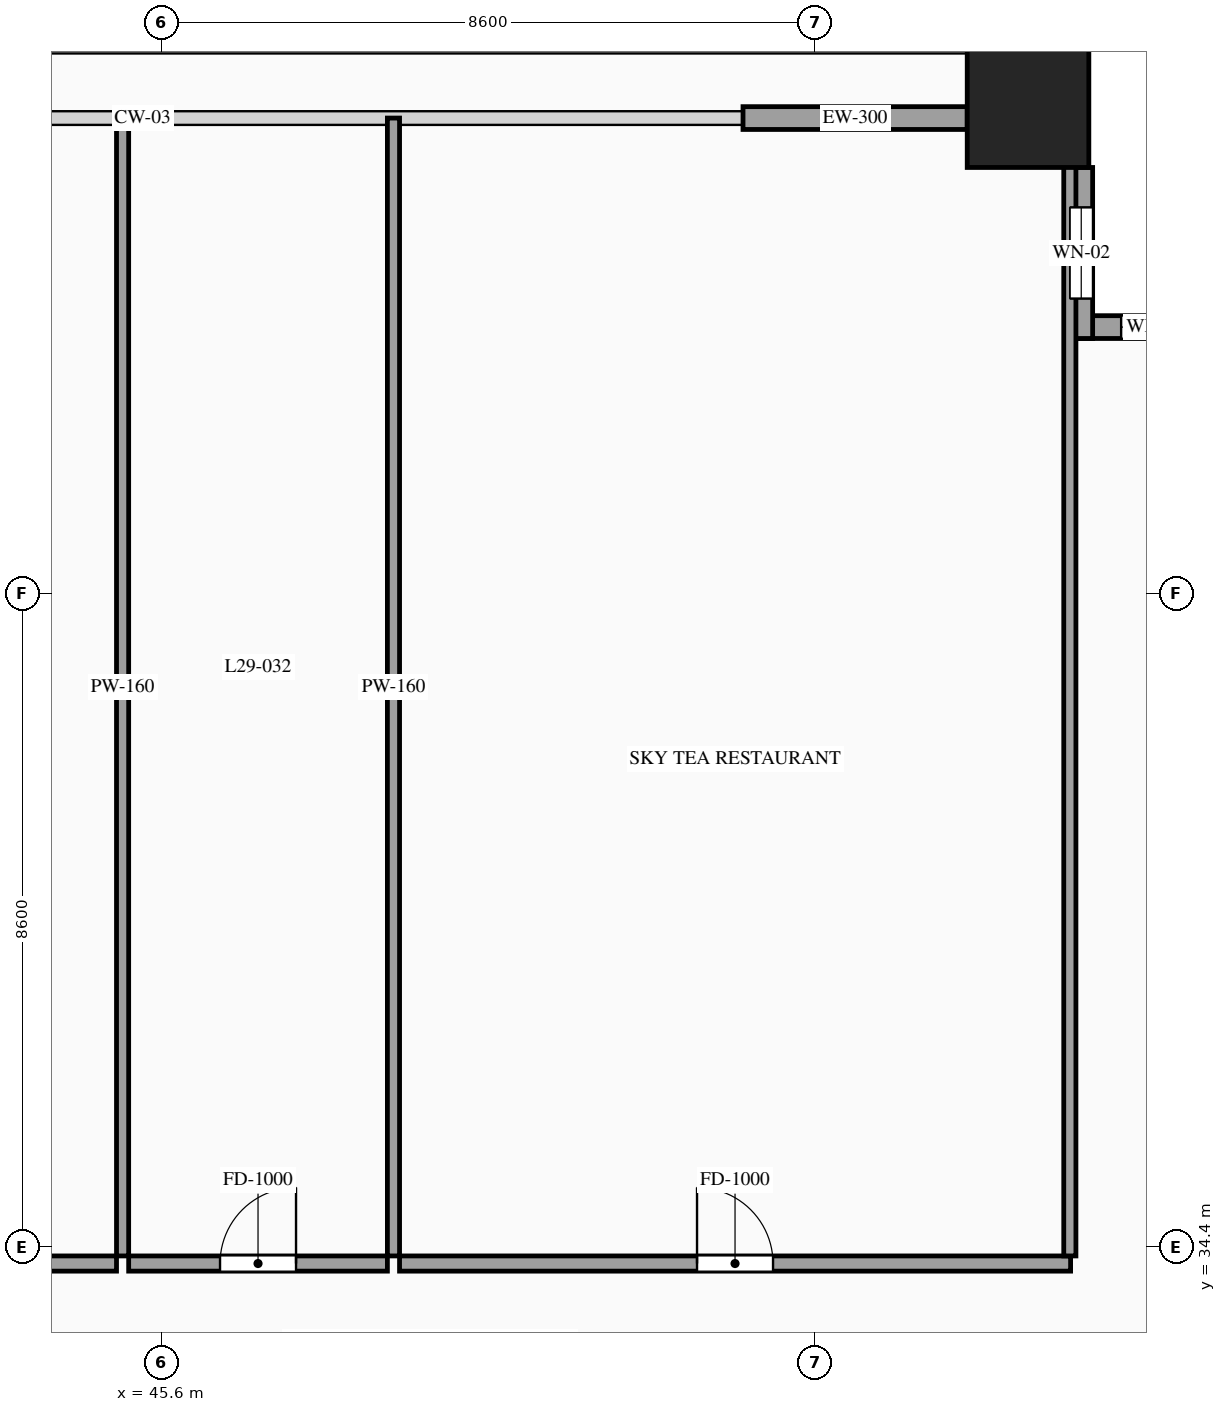
"""IFC4 building model, lengths in metres.
Left out: names, types, materials, properties, quantities, classifications, styles, units other than length and angle.
Written with IfcOpenShell. Run it as: python <this file> out.ifc"""

import sys

from ifc_helpers import new_model, si_unit, direction, frame, frame_2d, origin, origin_2d, place, context, subcontext, project, spatial, rectangle, hollow_rectangle, extrude, source, transform, mapped, element, fill, save


model = new_model("IFC4")
c1 = context("Model", 3, precision=1e-05, world=origin(), true_north=direction((0.0, 1.0)))
c2 = subcontext(c1, "Body", "Model", "MODEL_VIEW")
j1 = project(units=[si_unit("LENGTHUNIT", "METRE"), si_unit("PLANEANGLEUNIT", "RADIAN")], contexts=[c1])
p1 = place(None, origin())
s1 = spatial("IfcSite", under=j1, at=p1, CompositionType="ELEMENT")
p2 = place(p1, origin())
s2 = spatial("IfcBuilding", under=s1, at=p2, CompositionType="ELEMENT")
p3 = place(p2, frame((0.0, 0.0, 111.8)))
s3 = spatial("IfcBuildingStorey", under=s2, at=p3, CompositionType="ELEMENT", Elevation=111.8)
m1 = source(origin(), c2, "Body", "SweptSolid", [
    extrude(hollow_rectangle(XDim=1.6, YDim=1.6, WallThickness=0.07, at=origin_2d()), origin(), (0.0, 0.0, 1.0), 3.6),
])
p4 = place(p3, frame((57.0, 49.4, 0.0), z_axis=(0.0, 0.0, 1.0), x_axis=(1.0, 0.0, 0.0)))
e1 = element("IfcColumn", 1, at=p4, inside=s3, PredefinedType="COLUMN", context=c2, shape_type="MappedRepresentation", body=[
    mapped(m1, transform((0.0, 0.0, 0.0), scale=1.0)),
])
p5 = place(p3, frame((59.8, 46.5, 0.0), z_axis=(0.0, 0.0, 1.0), x_axis=(-1.0, 0.0, 0.0)))
e2 = element("IfcWall", 2, at=p5, inside=s3, PredefinedType="SOLIDWALL", context=c2, shape_type="SweptSolid", body=[
    extrude(rectangle(XDim=2.25, YDim=0.3, at=frame_2d((1.125, 0.0))), origin(), (0.0, 0.0, 1.0), 3.38),
])
p6 = place(p5, frame((0.675, 0.0, 0.85)))
e3 = element("IfcOpeningElement", 3, at=p6, cuts=e2, PredefinedType="OPENING", context=c2, shape_type="SweptSolid", body=[
    extrude(rectangle(XDim=0.9, YDim=1.5, at=frame_2d((0.45, 0.75))), frame((0.0, 0.165, 0.0), z_axis=(0.0, -1.0, 0.0), x_axis=(1.0, 0.0, 0.0)), (0.0, 0.0, 1.0), 0.33),
])
p7 = place(p3, frame((57.7, 46.35, 0.0), z_axis=(0.0, 0.0, 1.0), x_axis=(0.0, 1.0, 0.0)))
e4 = element("IfcWall", 4, at=p7, inside=s3, PredefinedType="SOLIDWALL", context=c2, shape_type="SweptSolid", body=[
    extrude(rectangle(XDim=2.25, YDim=0.3, at=frame_2d((1.125, 0.0))), origin(), (0.0, 0.0, 1.0), 3.38),
])
p8 = place(p7, frame((0.525, 0.0, 0.85)))
e5 = element("IfcOpeningElement", 5, at=p8, cuts=e4, PredefinedType="OPENING", context=c2, shape_type="SweptSolid", body=[
    extrude(rectangle(XDim=1.2, YDim=2.1, at=frame_2d((0.6, 1.05))), frame((0.0, 0.165, 0.0), z_axis=(0.0, -1.0, 0.0), x_axis=(1.0, 0.0, 0.0)), (0.0, 0.0, 1.0), 0.33),
])
m2 = source(origin(), c2, "Body", "SweptSolid", [
    extrude(rectangle(XDim=2.95, YDim=0.3, at=frame_2d((1.475, 0.0))), origin(), (0.0, 0.0, 1.0), 2.775),
])
p9 = place(p3, frame((53.25, 49.25, 0.0), z_axis=(0.0, 0.0, 1.0), x_axis=(1.0, 0.0, 0.0)))
e6 = element("IfcWall", 6, at=p9, inside=s3, PredefinedType="SOLIDWALL", context=c2, shape_type="MappedRepresentation", body=[
    mapped(m2, transform((0.0, 0.0, 0.0), scale=1.0)),
])
p10 = place(p3, frame((35.024, 34.18, 0.0), z_axis=(0.0, 0.0, 1.0), x_axis=(1.0, 0.0, 0.0)))
e7 = element("IfcWall", 7, at=p10, inside=s3, PredefinedType="PARTITIONING", context=c2, shape_type="SweptSolid", body=[
    extrude(rectangle(XDim=9.983, YDim=0.2, at=frame_2d((4.992, 0.0))), origin(), (0.0, 0.0, 1.0), 3.38),
])
p11 = place(p10, frame((5.697, 0.0, 0.0)))
e8 = element("IfcOpeningElement", 8, at=p11, cuts=e7, PredefinedType="OPENING", context=c2, shape_type="SweptSolid", body=[
    extrude(rectangle(XDim=1.0, YDim=2.2, at=frame_2d((0.5, 1.1))), frame((0.0, 0.115, 0.0), z_axis=(0.0, -1.0, 0.0), x_axis=(1.0, 0.0, 0.0)), (0.0, 0.0, 1.0), 0.23),
])
m3 = source(origin(), c2, "Body", "SweptSolid", [
    extrude(rectangle(XDim=14.97, YDim=0.16, at=frame_2d((7.485, 0.0))), origin(), (0.0, 0.0, 1.0), 3.38),
])
p12 = place(p3, frame((45.087, 34.28, 0.0), z_axis=(0.0, 0.0, 1.0), x_axis=(0.0, 1.0, 0.0)))
e9 = element("IfcWall", 9, at=p12, inside=s3, PredefinedType="PARTITIONING", context=c2, shape_type="MappedRepresentation", body=[
    mapped(m3, transform((0.0, 0.0, 0.0), scale=1.0)),
])
p13 = place(p3, frame((45.167, 34.18, 0.0), z_axis=(0.0, 0.0, 1.0), x_axis=(1.0, 0.0, 0.0)))
e10 = element("IfcWall", 10, at=p13, inside=s3, PredefinedType="PARTITIONING", context=c2, shape_type="SweptSolid", body=[
    extrude(rectangle(XDim=3.404, YDim=0.2, at=frame_2d((1.702, 0.0))), origin(), (0.0, 0.0, 1.0), 3.38),
])
p14 = place(p13, frame((1.202, 0.0, 0.0)))
e11 = element("IfcOpeningElement", 11, at=p14, cuts=e10, PredefinedType="OPENING", context=c2, shape_type="SweptSolid", body=[
    extrude(rectangle(XDim=1.0, YDim=2.2, at=frame_2d((0.5, 1.1))), frame((0.0, 0.115, 0.0), z_axis=(0.0, -1.0, 0.0), x_axis=(1.0, 0.0, 0.0)), (0.0, 0.0, 1.0), 0.23),
])
p15 = place(p3, frame((48.651, 34.28, 0.0), z_axis=(0.0, 0.0, 1.0), x_axis=(0.0, 1.0, 0.0)))
e12 = element("IfcWall", 12, at=p15, inside=s3, PredefinedType="PARTITIONING", context=c2, shape_type="MappedRepresentation", body=[
    mapped(m3, transform((0.0, 0.0, 0.0), scale=1.0)),
])
p16 = place(p3, frame((48.731, 34.18, 0.0), z_axis=(0.0, 0.0, 1.0), x_axis=(1.0, 0.0, 0.0)))
e13 = element("IfcWall", 13, at=p16, inside=s3, PredefinedType="PARTITIONING", context=c2, shape_type="SweptSolid", body=[
    extrude(rectangle(XDim=8.829, YDim=0.2, at=frame_2d((4.415, 0.0))), origin(), (0.0, 0.0, 1.0), 3.38),
])
p17 = place(p16, frame((3.914, 0.0, 0.0)))
e14 = element("IfcOpeningElement", 14, at=p17, cuts=e13, PredefinedType="OPENING", context=c2, shape_type="SweptSolid", body=[
    extrude(rectangle(XDim=1.0, YDim=2.2, at=frame_2d((0.5, 1.1))), frame((0.0, 0.115, 0.0), z_axis=(0.0, -1.0, 0.0), x_axis=(1.0, 0.0, 0.0)), (0.0, 0.0, 1.0), 0.23),
])
m4 = source(origin(), c2, "Body", "SweptSolid", [
    extrude(rectangle(XDim=14.82, YDim=0.16, at=frame_2d((7.41, 0.0))), origin(), (0.0, 0.0, 1.0), 3.38),
])
p18 = place(p3, frame((57.55, 34.28, 0.0), z_axis=(0.0, 0.0, 1.0), x_axis=(0.0, 1.0, 0.0)))
e15 = element("IfcWall", 15, at=p18, inside=s3, PredefinedType="PARTITIONING", context=c2, shape_type="MappedRepresentation", body=[
    mapped(m4, transform((0.0, 0.0, 0.0), scale=1.0)),
])
m5 = source(origin(), c2, "Body", "SweptSolid", [
    extrude(rectangle(XDim=0.9, YDim=1.5, at=frame_2d((0.45, 0.75))), frame((0.0, 0.03, 0.0), z_axis=(0.0, -1.0, 0.0), x_axis=(1.0, 0.0, 0.0)), (0.0, 0.0, 1.0), 0.06),
])
p19 = place(p6, origin())
e16 = element("IfcWindow", 16, at=p19, inside=s3, PartitioningType="SINGLE_PANEL", PredefinedType="WINDOW", context=c2, shape_type="MappedRepresentation", body=[
    mapped(m5, transform((0.0, 0.0, 0.0), scale=1.0)),
])
fill(e3, e16)
m6 = source(origin(), c2, "Body", "SweptSolid", [
    extrude(rectangle(XDim=1.2, YDim=2.1, at=frame_2d((0.6, 1.05))), frame((0.0, 0.03, 0.0), z_axis=(0.0, -1.0, 0.0), x_axis=(1.0, 0.0, 0.0)), (0.0, 0.0, 1.0), 0.06),
])
p20 = place(p8, origin())
e17 = element("IfcWindow", 17, at=p20, inside=s3, PartitioningType="SINGLE_PANEL", PredefinedType="WINDOW", context=c2, shape_type="MappedRepresentation", body=[
    mapped(m6, transform((0.0, 0.0, 0.0), scale=1.0)),
])
fill(e5, e17)
m7 = source(origin(), c2, "Body", "SweptSolid", [
    extrude(rectangle(XDim=1.0, YDim=2.2, at=frame_2d((0.5, 1.1))), frame((0.0, 0.025, 0.0), z_axis=(0.0, -1.0, 0.0), x_axis=(1.0, 0.0, 0.0)), (0.0, 0.0, 1.0), 0.05),
])
p21 = place(p14, origin())
e18 = element("IfcDoor", 18, at=p21, inside=s3, OperationType="SINGLE_SWING_RIGHT", PredefinedType="DOOR", context=c2, shape_type="MappedRepresentation", body=[
    mapped(m7, transform((0.0, 0.0, 0.0), scale=1.0)),
])
fill(e11, e18)
p22 = place(p17, origin())
e19 = element("IfcDoor", 19, at=p22, inside=s3, OperationType="SINGLE_SWING_LEFT", PredefinedType="DOOR", context=c2, shape_type="MappedRepresentation", body=[
    mapped(m7, transform((0.0, 0.0, 0.0), scale=1.0)),
])
fill(e14, e19)
save(model, sys.argv[1])
